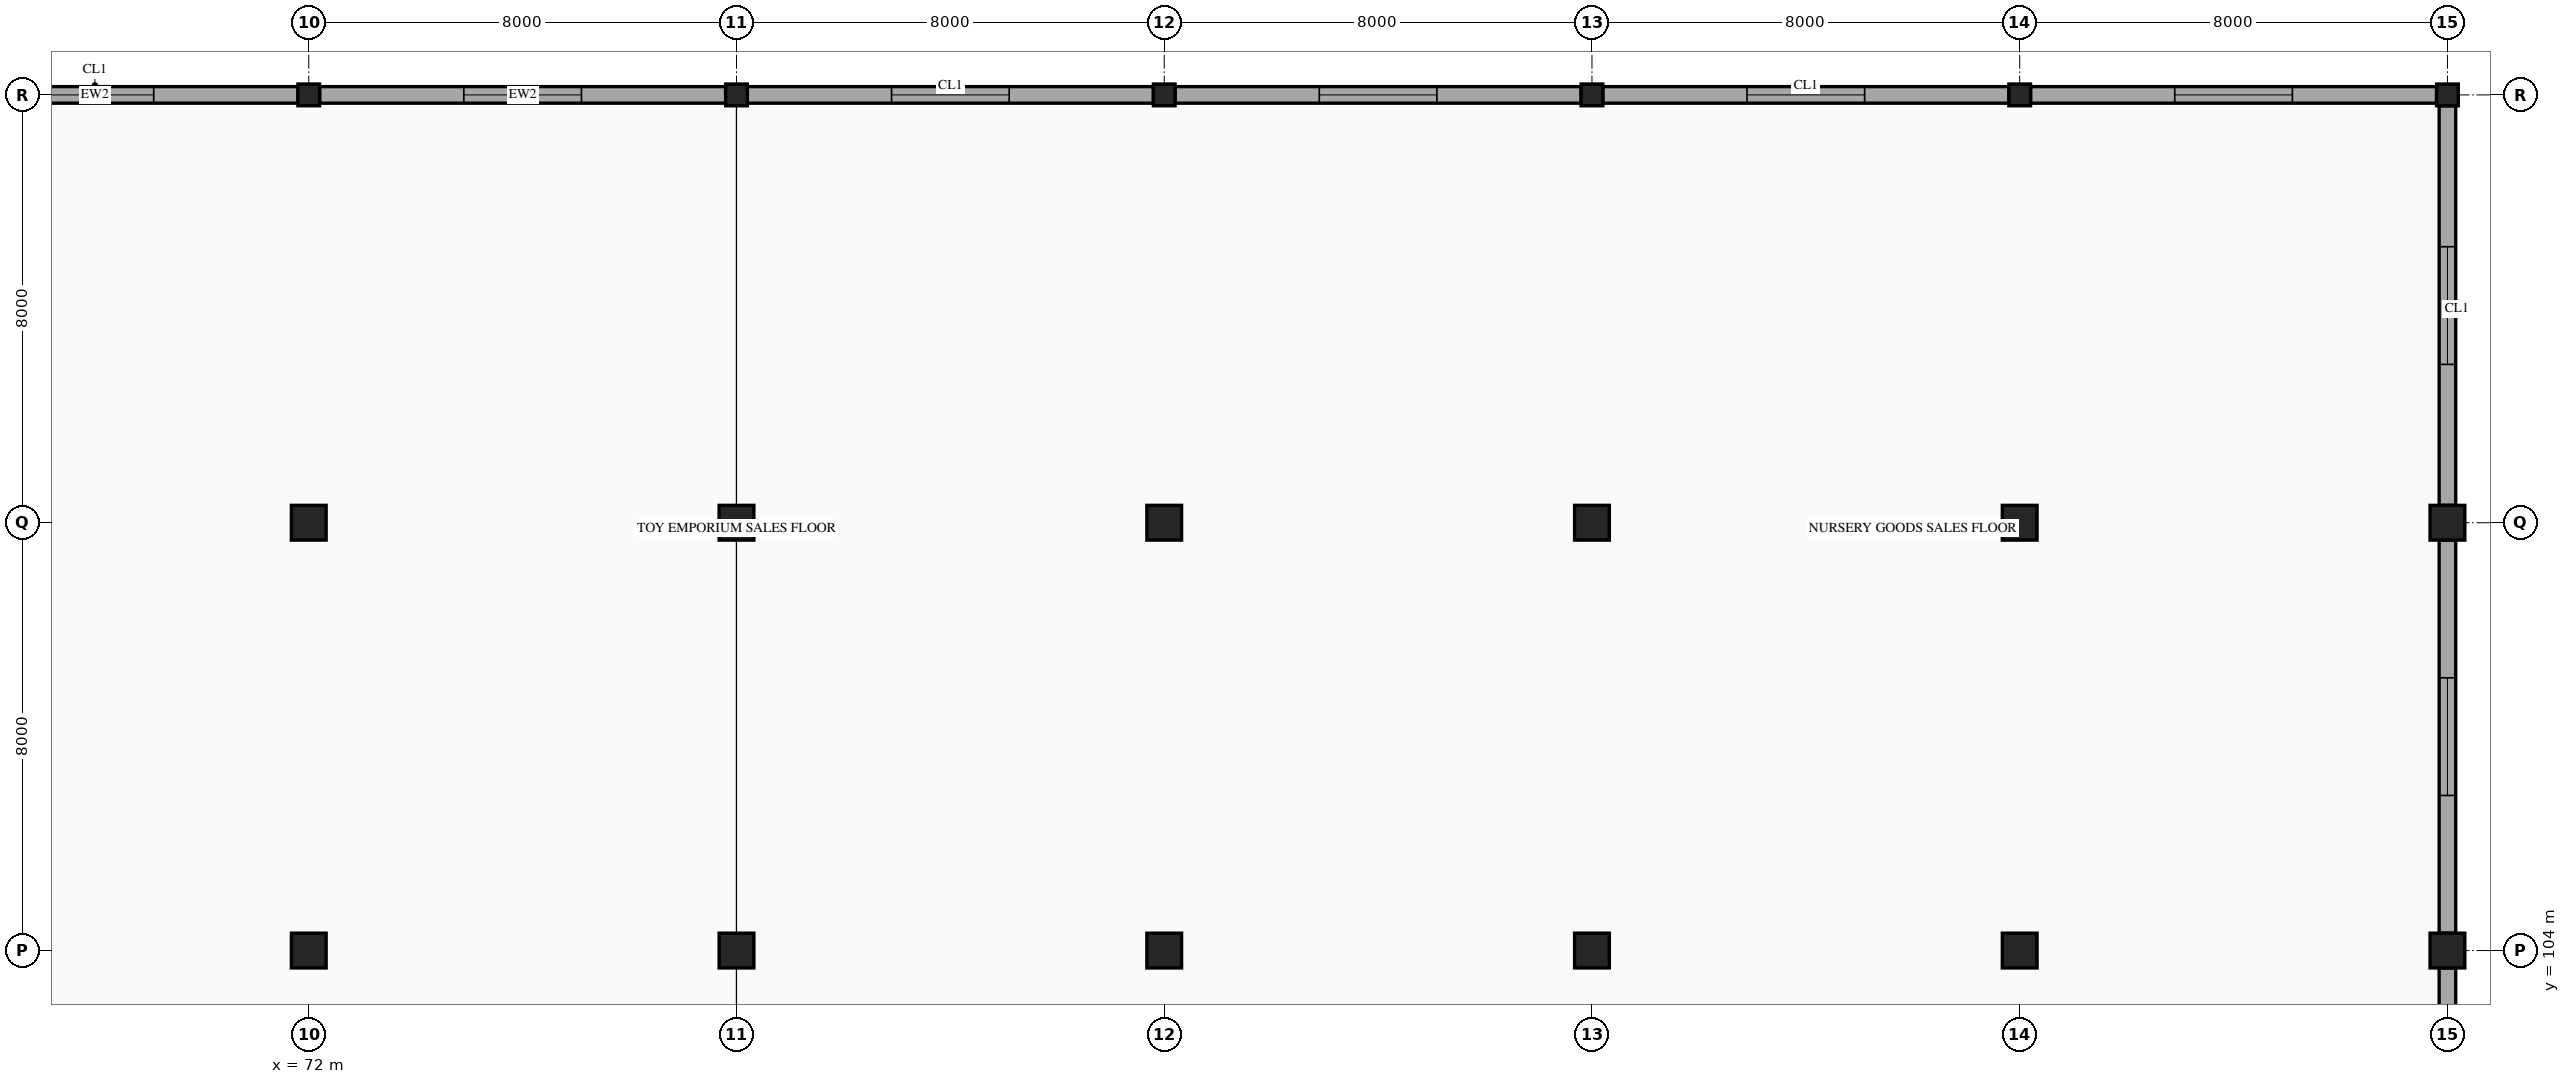
"""IFC4 building model, lengths in metres.
Left out: names, types, materials, properties, quantities, classifications, styles, units other than length and angle.
Written with IfcOpenShell. Run it as: python <this file> out.ifc"""

import sys

from ifc_helpers import new_model, si_unit, direction, frame, frame_2d, origin, origin_2d, place, context, subcontext, project, spatial, rectangle, hollow_rectangle, extrude, element, fill, save


model = new_model("IFC4")
c1 = context("Model", 3, precision=1e-05, world=origin(), true_north=direction((0.0, 1.0)))
c2 = subcontext(c1, "Body", "Model", "MODEL_VIEW")
j1 = project(units=[si_unit("LENGTHUNIT", "METRE"), si_unit("PLANEANGLEUNIT", "RADIAN")], contexts=[c1])
p1 = place(None, origin())
s1 = spatial("IfcSite", under=j1, at=p1, CompositionType="ELEMENT")
p2 = place(p1, origin())
s2 = spatial("IfcBuilding", under=s1, at=p2, CompositionType="ELEMENT")
p3 = place(p2, frame((0.0, 0.0, 14.9)))
s3 = spatial("IfcBuildingStorey", under=s2, at=p3, CompositionType="ELEMENT", Elevation=14.9)
for number, where, z_axis, x_axis in (
    (1, (72.0, 104.0, 0.0), (0.0, 0.0, 1.0), (1.0, 0.0, 0.0)),
    (2, (72.0, 112.0, 0.0), (0.0, 0.0, 1.0), (1.0, 0.0, 0.0)),
):
    element("IfcColumn", number, at=place(p3, frame(where, z_axis=z_axis, x_axis=x_axis)), inside=s3, PredefinedType="COLUMN", context=c2, shape_type="SweptSolid", body=[
        extrude(rectangle(XDim=0.65, YDim=0.65, at=origin_2d()), origin(), (0.0, 0.0, 1.0), 4.5),
    ])
p4 = place(p3, frame((72.0, 120.0, 0.0), z_axis=(0.0, 0.0, 1.0), x_axis=(1.0, 0.0, 0.0)))
e3 = element("IfcColumn", 3, at=p4, inside=s3, PredefinedType="COLUMN", context=c2, shape_type="SweptSolid", body=[
    extrude(hollow_rectangle(XDim=0.406, YDim=0.406, WallThickness=0.015, InnerFilletRadius=0.015, OuterFilletRadius=0.029, at=origin_2d()), origin(), (0.0, 0.0, 1.0), 4.5),
])
for number, where, z_axis, x_axis in (
    (4, (80.0, 104.0, 0.0), (0.0, 0.0, 1.0), (1.0, 0.0, 0.0)),
    (5, (80.0, 112.0, 0.0), (0.0, 0.0, 1.0), (1.0, 0.0, 0.0)),
):
    element("IfcColumn", number, at=place(p3, frame(where, z_axis=z_axis, x_axis=x_axis)), inside=s3, PredefinedType="COLUMN", context=c2, shape_type="SweptSolid", body=[
        extrude(rectangle(XDim=0.65, YDim=0.65, at=origin_2d()), origin(), (0.0, 0.0, 1.0), 4.5),
    ])
p5 = place(p3, frame((80.0, 120.0, 0.0), z_axis=(0.0, 0.0, 1.0), x_axis=(1.0, 0.0, 0.0)))
e6 = element("IfcColumn", 6, at=p5, inside=s3, PredefinedType="COLUMN", context=c2, shape_type="SweptSolid", body=[
    extrude(hollow_rectangle(XDim=0.406, YDim=0.406, WallThickness=0.015, InnerFilletRadius=0.015, OuterFilletRadius=0.029, at=origin_2d()), origin(), (0.0, 0.0, 1.0), 4.5),
])
for number, where, z_axis, x_axis in (
    (7, (88.0, 104.0, 0.0), (0.0, 0.0, 1.0), (1.0, 0.0, 0.0)),
    (8, (88.0, 112.0, 0.0), (0.0, 0.0, 1.0), (1.0, 0.0, 0.0)),
):
    element("IfcColumn", number, at=place(p3, frame(where, z_axis=z_axis, x_axis=x_axis)), inside=s3, PredefinedType="COLUMN", context=c2, shape_type="SweptSolid", body=[
        extrude(rectangle(XDim=0.65, YDim=0.65, at=origin_2d()), origin(), (0.0, 0.0, 1.0), 4.5),
    ])
p6 = place(p3, frame((88.0, 120.0, 0.0), z_axis=(0.0, 0.0, 1.0), x_axis=(1.0, 0.0, 0.0)))
e9 = element("IfcColumn", 9, at=p6, inside=s3, PredefinedType="COLUMN", context=c2, shape_type="SweptSolid", body=[
    extrude(hollow_rectangle(XDim=0.406, YDim=0.406, WallThickness=0.015, InnerFilletRadius=0.015, OuterFilletRadius=0.029, at=origin_2d()), origin(), (0.0, 0.0, 1.0), 4.5),
])
for number, where, z_axis, x_axis in (
    (10, (96.0, 104.0, 0.0), (0.0, 0.0, 1.0), (1.0, 0.0, 0.0)),
    (11, (96.0, 112.0, 0.0), (0.0, 0.0, 1.0), (1.0, 0.0, 0.0)),
):
    element("IfcColumn", number, at=place(p3, frame(where, z_axis=z_axis, x_axis=x_axis)), inside=s3, PredefinedType="COLUMN", context=c2, shape_type="SweptSolid", body=[
        extrude(rectangle(XDim=0.65, YDim=0.65, at=origin_2d()), origin(), (0.0, 0.0, 1.0), 4.5),
    ])
p7 = place(p3, frame((96.0, 120.0, 0.0), z_axis=(0.0, 0.0, 1.0), x_axis=(1.0, 0.0, 0.0)))
e12 = element("IfcColumn", 12, at=p7, inside=s3, PredefinedType="COLUMN", context=c2, shape_type="SweptSolid", body=[
    extrude(hollow_rectangle(XDim=0.406, YDim=0.406, WallThickness=0.015, InnerFilletRadius=0.015, OuterFilletRadius=0.029, at=origin_2d()), origin(), (0.0, 0.0, 1.0), 4.5),
])
for number, where, z_axis, x_axis in (
    (13, (104.0, 104.0, 0.0), (0.0, 0.0, 1.0), (1.0, 0.0, 0.0)),
    (14, (104.0, 112.0, 0.0), (0.0, 0.0, 1.0), (1.0, 0.0, 0.0)),
):
    element("IfcColumn", number, at=place(p3, frame(where, z_axis=z_axis, x_axis=x_axis)), inside=s3, PredefinedType="COLUMN", context=c2, shape_type="SweptSolid", body=[
        extrude(rectangle(XDim=0.65, YDim=0.65, at=origin_2d()), origin(), (0.0, 0.0, 1.0), 4.5),
    ])
p8 = place(p3, frame((104.0, 120.0, 0.0), z_axis=(0.0, 0.0, 1.0), x_axis=(1.0, 0.0, 0.0)))
e15 = element("IfcColumn", 15, at=p8, inside=s3, PredefinedType="COLUMN", context=c2, shape_type="SweptSolid", body=[
    extrude(hollow_rectangle(XDim=0.406, YDim=0.406, WallThickness=0.015, InnerFilletRadius=0.015, OuterFilletRadius=0.029, at=origin_2d()), origin(), (0.0, 0.0, 1.0), 4.5),
])
for number, where, z_axis, x_axis in (
    (16, (112.0, 104.0, 0.0), (0.0, 0.0, 1.0), (1.0, 0.0, 0.0)),
    (17, (112.0, 112.0, 0.0), (0.0, 0.0, 1.0), (1.0, 0.0, 0.0)),
):
    element("IfcColumn", number, at=place(p3, frame(where, z_axis=z_axis, x_axis=x_axis)), inside=s3, PredefinedType="COLUMN", context=c2, shape_type="SweptSolid", body=[
        extrude(rectangle(XDim=0.65, YDim=0.65, at=origin_2d()), origin(), (0.0, 0.0, 1.0), 4.5),
    ])
p9 = place(p3, frame((112.0, 120.0, 0.0), z_axis=(0.0, 0.0, 1.0), x_axis=(1.0, 0.0, 0.0)))
e18 = element("IfcColumn", 18, at=p9, inside=s3, PredefinedType="COLUMN", context=c2, shape_type="SweptSolid", body=[
    extrude(hollow_rectangle(XDim=0.406, YDim=0.406, WallThickness=0.015, InnerFilletRadius=0.015, OuterFilletRadius=0.029, at=origin_2d()), origin(), (0.0, 0.0, 1.0), 4.5),
])
p10 = place(p3, frame((64.203, 120.0, 0.0), z_axis=(0.0, 0.0, 1.0), x_axis=(1.0, 0.0, 0.0)))
e19 = element("IfcWall", 19, at=p10, inside=s3, PredefinedType="STANDARD", context=c2, shape_type="SweptSolid", body=[
    extrude(rectangle(XDim=7.594, YDim=0.31, at=frame_2d((3.797, 0.0))), origin(), (0.0, 0.0, 1.0), 3.48),
])
p11 = place(p10, frame((2.697, 0.0, 0.8)))
e20 = element("IfcOpeningElement", 20, at=p11, cuts=e19, PredefinedType="OPENING", context=c2, shape_type="SweptSolid", body=[
    extrude(rectangle(XDim=2.2, YDim=2.05, at=frame_2d((1.1, 1.025))), frame((0.0, 0.165, 0.0), z_axis=(0.0, -1.0, 0.0), x_axis=(1.0, 0.0, 0.0)), (0.0, 0.0, 1.0), 0.33),
])
p12 = place(p3, frame((72.203, 120.0, 0.0), z_axis=(0.0, 0.0, 1.0), x_axis=(1.0, 0.0, 0.0)))
e21 = element("IfcWall", 21, at=p12, inside=s3, PredefinedType="STANDARD", context=c2, shape_type="SweptSolid", body=[
    extrude(rectangle(XDim=7.594, YDim=0.31, at=frame_2d((3.797, 0.0))), origin(), (0.0, 0.0, 1.0), 3.48),
])
p13 = place(p12, frame((2.697, 0.0, 0.8)))
e22 = element("IfcOpeningElement", 22, at=p13, cuts=e21, PredefinedType="OPENING", context=c2, shape_type="SweptSolid", body=[
    extrude(rectangle(XDim=2.2, YDim=2.05, at=frame_2d((1.1, 1.025))), frame((0.0, 0.165, 0.0), z_axis=(0.0, -1.0, 0.0), x_axis=(1.0, 0.0, 0.0)), (0.0, 0.0, 1.0), 0.33),
])
p14 = place(p3, frame((80.203, 120.0, 0.0), z_axis=(0.0, 0.0, 1.0), x_axis=(1.0, 0.0, 0.0)))
e23 = element("IfcWall", 23, at=p14, inside=s3, PredefinedType="STANDARD", context=c2, shape_type="SweptSolid", body=[
    extrude(rectangle(XDim=7.594, YDim=0.31, at=frame_2d((3.797, 0.0))), origin(), (0.0, 0.0, 1.0), 3.48),
])
p15 = place(p14, frame((2.697, 0.0, 0.8)))
e24 = element("IfcOpeningElement", 24, at=p15, cuts=e23, PredefinedType="OPENING", context=c2, shape_type="SweptSolid", body=[
    extrude(rectangle(XDim=2.2, YDim=2.05, at=frame_2d((1.1, 1.025))), frame((0.0, 0.165, 0.0), z_axis=(0.0, -1.0, 0.0), x_axis=(1.0, 0.0, 0.0)), (0.0, 0.0, 1.0), 0.33),
])
p16 = place(p3, frame((88.203, 120.0, 0.0), z_axis=(0.0, 0.0, 1.0), x_axis=(1.0, 0.0, 0.0)))
e25 = element("IfcWall", 25, at=p16, inside=s3, PredefinedType="STANDARD", context=c2, shape_type="SweptSolid", body=[
    extrude(rectangle(XDim=7.594, YDim=0.31, at=frame_2d((3.797, 0.0))), origin(), (0.0, 0.0, 1.0), 3.48),
])
p17 = place(p16, frame((2.697, 0.0, 0.8)))
e26 = element("IfcOpeningElement", 26, at=p17, cuts=e25, PredefinedType="OPENING", context=c2, shape_type="SweptSolid", body=[
    extrude(rectangle(XDim=2.2, YDim=2.05, at=frame_2d((1.1, 1.025))), frame((0.0, 0.165, 0.0), z_axis=(0.0, -1.0, 0.0), x_axis=(1.0, 0.0, 0.0)), (0.0, 0.0, 1.0), 0.33),
])
p18 = place(p3, frame((96.203, 120.0, 0.0), z_axis=(0.0, 0.0, 1.0), x_axis=(1.0, 0.0, 0.0)))
e27 = element("IfcWall", 27, at=p18, inside=s3, PredefinedType="STANDARD", context=c2, shape_type="SweptSolid", body=[
    extrude(rectangle(XDim=7.594, YDim=0.31, at=frame_2d((3.797, 0.0))), origin(), (0.0, 0.0, 1.0), 3.48),
])
p19 = place(p18, frame((2.697, 0.0, 0.8)))
e28 = element("IfcOpeningElement", 28, at=p19, cuts=e27, PredefinedType="OPENING", context=c2, shape_type="SweptSolid", body=[
    extrude(rectangle(XDim=2.2, YDim=2.05, at=frame_2d((1.1, 1.025))), frame((0.0, 0.165, 0.0), z_axis=(0.0, -1.0, 0.0), x_axis=(1.0, 0.0, 0.0)), (0.0, 0.0, 1.0), 0.33),
])
p20 = place(p3, frame((104.203, 120.0, 0.0), z_axis=(0.0, 0.0, 1.0), x_axis=(1.0, 0.0, 0.0)))
e29 = element("IfcWall", 29, at=p20, inside=s3, PredefinedType="STANDARD", context=c2, shape_type="SweptSolid", body=[
    extrude(rectangle(XDim=7.594, YDim=0.31, at=frame_2d((3.797, 0.0))), origin(), (0.0, 0.0, 1.0), 3.48),
])
p21 = place(p20, frame((2.697, 0.0, 0.8)))
e30 = element("IfcOpeningElement", 30, at=p21, cuts=e29, PredefinedType="OPENING", context=c2, shape_type="SweptSolid", body=[
    extrude(rectangle(XDim=2.2, YDim=2.05, at=frame_2d((1.1, 1.025))), frame((0.0, 0.165, 0.0), z_axis=(0.0, -1.0, 0.0), x_axis=(1.0, 0.0, 0.0)), (0.0, 0.0, 1.0), 0.33),
])
p22 = place(p3, frame((112.0, 119.797, 0.0), z_axis=(0.0, 0.0, 1.0), x_axis=(0.0, -1.0, 0.0)))
e31 = element("IfcWall", 31, at=p22, inside=s3, PredefinedType="STANDARD", context=c2, shape_type="SweptSolid", body=[
    extrude(rectangle(XDim=7.472, YDim=0.31, at=frame_2d((3.736, 0.0))), origin(), (0.0, 0.0, 1.0), 3.48),
])
p23 = place(p22, frame((2.636, 0.0, 0.8)))
e32 = element("IfcOpeningElement", 32, at=p23, cuts=e31, PredefinedType="OPENING", context=c2, shape_type="SweptSolid", body=[
    extrude(rectangle(XDim=2.2, YDim=2.05, at=frame_2d((1.1, 1.025))), frame((0.0, 0.165, 0.0), z_axis=(0.0, -1.0, 0.0), x_axis=(1.0, 0.0, 0.0)), (0.0, 0.0, 1.0), 0.33),
])
p24 = place(p3, frame((112.0, 111.675, 0.0), z_axis=(0.0, 0.0, 1.0), x_axis=(0.0, -1.0, 0.0)))
e33 = element("IfcWall", 33, at=p24, inside=s3, PredefinedType="STANDARD", context=c2, shape_type="SweptSolid", body=[
    extrude(rectangle(XDim=7.35, YDim=0.31, at=frame_2d((3.675, 0.0))), origin(), (0.0, 0.0, 1.0), 3.48),
])
p25 = place(p24, frame((2.575, 0.0, 0.8)))
e34 = element("IfcOpeningElement", 34, at=p25, cuts=e33, PredefinedType="OPENING", context=c2, shape_type="SweptSolid", body=[
    extrude(rectangle(XDim=2.2, YDim=2.05, at=frame_2d((1.1, 1.025))), frame((0.0, 0.165, 0.0), z_axis=(0.0, -1.0, 0.0), x_axis=(1.0, 0.0, 0.0)), (0.0, 0.0, 1.0), 0.33),
])
p26 = place(p3, frame((112.0, 103.675, 0.0), z_axis=(0.0, 0.0, 1.0), x_axis=(0.0, -1.0, 0.0)))
e35 = element("IfcWall", 35, at=p26, inside=s3, PredefinedType="STANDARD", context=c2, shape_type="SweptSolid", body=[
    extrude(rectangle(XDim=7.35, YDim=0.31, at=frame_2d((3.675, 0.0))), origin(), (0.0, 0.0, 1.0), 3.48),
])
p27 = place(p11, origin())
e36 = element("IfcWindow", 36, at=p27, inside=s3, PartitioningType="DOUBLE_PANEL_VERTICAL", PredefinedType="WINDOW", context=c2, shape_type="SweptSolid", body=[
    extrude(rectangle(XDim=2.2, YDim=2.05, at=frame_2d((1.1, 1.025))), frame((0.0, 0.03, 0.0), z_axis=(0.0, -1.0, 0.0), x_axis=(1.0, 0.0, 0.0)), (0.0, 0.0, 1.0), 0.06),
])
fill(e20, e36)
p28 = place(p13, origin())
e37 = element("IfcWindow", 37, at=p28, inside=s3, PartitioningType="DOUBLE_PANEL_VERTICAL", PredefinedType="WINDOW", context=c2, shape_type="SweptSolid", body=[
    extrude(rectangle(XDim=2.2, YDim=2.05, at=frame_2d((1.1, 1.025))), frame((0.0, 0.03, 0.0), z_axis=(0.0, -1.0, 0.0), x_axis=(1.0, 0.0, 0.0)), (0.0, 0.0, 1.0), 0.06),
])
fill(e22, e37)
p29 = place(p15, origin())
e38 = element("IfcWindow", 38, at=p29, inside=s3, PartitioningType="DOUBLE_PANEL_VERTICAL", PredefinedType="WINDOW", context=c2, shape_type="SweptSolid", body=[
    extrude(rectangle(XDim=2.2, YDim=2.05, at=frame_2d((1.1, 1.025))), frame((0.0, 0.03, 0.0), z_axis=(0.0, -1.0, 0.0), x_axis=(1.0, 0.0, 0.0)), (0.0, 0.0, 1.0), 0.06),
])
fill(e24, e38)
p30 = place(p17, origin())
e39 = element("IfcWindow", 39, at=p30, inside=s3, PartitioningType="DOUBLE_PANEL_VERTICAL", PredefinedType="WINDOW", context=c2, shape_type="SweptSolid", body=[
    extrude(rectangle(XDim=2.2, YDim=2.05, at=frame_2d((1.1, 1.025))), frame((0.0, 0.03, 0.0), z_axis=(0.0, -1.0, 0.0), x_axis=(1.0, 0.0, 0.0)), (0.0, 0.0, 1.0), 0.06),
])
fill(e26, e39)
p31 = place(p19, origin())
e40 = element("IfcWindow", 40, at=p31, inside=s3, PartitioningType="DOUBLE_PANEL_VERTICAL", PredefinedType="WINDOW", context=c2, shape_type="SweptSolid", body=[
    extrude(rectangle(XDim=2.2, YDim=2.05, at=frame_2d((1.1, 1.025))), frame((0.0, 0.03, 0.0), z_axis=(0.0, -1.0, 0.0), x_axis=(1.0, 0.0, 0.0)), (0.0, 0.0, 1.0), 0.06),
])
fill(e28, e40)
p32 = place(p21, origin())
e41 = element("IfcWindow", 41, at=p32, inside=s3, PartitioningType="DOUBLE_PANEL_VERTICAL", PredefinedType="WINDOW", context=c2, shape_type="SweptSolid", body=[
    extrude(rectangle(XDim=2.2, YDim=2.05, at=frame_2d((1.1, 1.025))), frame((0.0, 0.03, 0.0), z_axis=(0.0, -1.0, 0.0), x_axis=(1.0, 0.0, 0.0)), (0.0, 0.0, 1.0), 0.06),
])
fill(e30, e41)
p33 = place(p23, origin())
e42 = element("IfcWindow", 42, at=p33, inside=s3, PartitioningType="DOUBLE_PANEL_VERTICAL", PredefinedType="WINDOW", context=c2, shape_type="SweptSolid", body=[
    extrude(rectangle(XDim=2.2, YDim=2.05, at=frame_2d((1.1, 1.025))), frame((0.0, 0.03, 0.0), z_axis=(0.0, -1.0, 0.0), x_axis=(1.0, 0.0, 0.0)), (0.0, 0.0, 1.0), 0.06),
])
fill(e32, e42)
p34 = place(p25, origin())
e43 = element("IfcWindow", 43, at=p34, inside=s3, PartitioningType="DOUBLE_PANEL_VERTICAL", PredefinedType="WINDOW", context=c2, shape_type="SweptSolid", body=[
    extrude(rectangle(XDim=2.2, YDim=2.05, at=frame_2d((1.1, 1.025))), frame((0.0, 0.03, 0.0), z_axis=(0.0, -1.0, 0.0), x_axis=(1.0, 0.0, 0.0)), (0.0, 0.0, 1.0), 0.06),
])
fill(e34, e43)
save(model, sys.argv[1])
